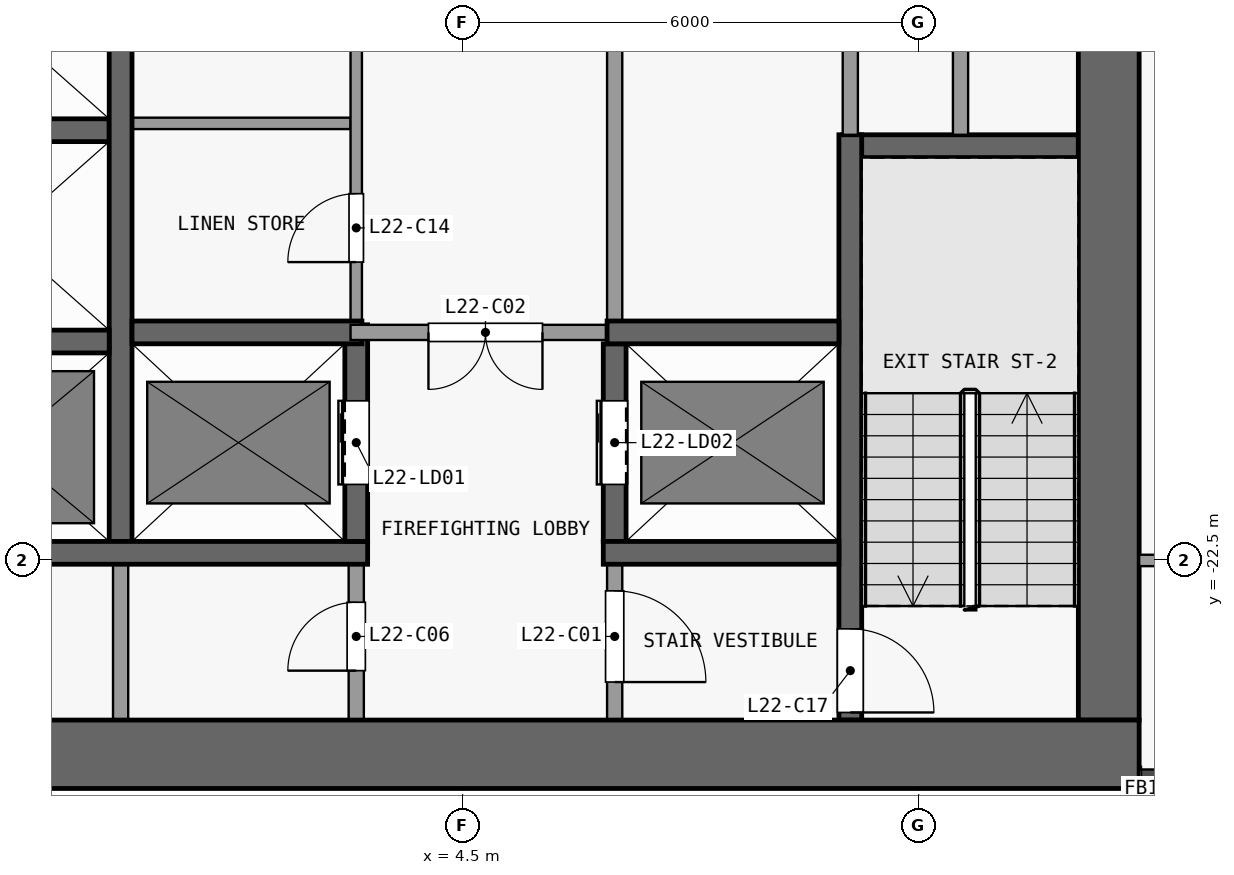
"""IFC4 building model, lengths in metres.
Left out: names, types, materials, properties, quantities, classifications, styles, units other than length and angle.
Written with IfcOpenShell. Run it as: python <this file> out.ifc"""

import sys

from ifc_helpers import new_model, si_unit, direction, frame, frame_2d, origin, place, context, subcontext, project, spatial, rectangle, extrude, element, fill, save


model = new_model("IFC4")
c1 = context("Model", 3, precision=1e-05, world=origin(), true_north=direction((0.0, 1.0)))
c2 = subcontext(c1, "Body", "Model", "MODEL_VIEW")
j1 = project(units=[si_unit("LENGTHUNIT", "METRE"), si_unit("PLANEANGLEUNIT", "RADIAN")], contexts=[c1])
p1 = place(None, origin())
s1 = spatial("IfcSite", under=j1, at=p1, CompositionType="ELEMENT")
p2 = place(p1, origin())
s2 = spatial("IfcBuilding", under=s1, at=p2, CompositionType="ELEMENT")
p3 = place(p2, frame((0.0, 0.0, 91.9)))
s3 = spatial("IfcBuildingStorey", under=s2, at=p3, CompositionType="ELEMENT", Elevation=91.9)
p4 = place(p3, frame((-13.4, -25.05, 0.0), z_axis=(0.0, 0.0, 1.0), x_axis=(1.0, 0.0, 0.0)))
e1 = element("IfcWall", 1, at=p4, inside=s3, PredefinedType="SHEAR", context=c2, shape_type="SweptSolid", body=[
    extrude(rectangle(XDim=26.8, YDim=0.9, at=frame_2d((13.4, 0.0))), origin(), (0.0, 0.0, 1.0), 3.3),
])
p5 = place(p3, frame((13.0, -24.6, 0.0), z_axis=(0.0, 0.0, 1.0), x_axis=(0.0, 1.0, 0.0)))
e2 = element("IfcWall", 2, at=p5, inside=s3, PredefinedType="SHEAR", context=c2, shape_type="SweptSolid", body=[
    extrude(rectangle(XDim=16.1, YDim=0.8, at=frame_2d((8.05, 0.0))), origin(), (0.0, 0.0, 1.0), 3.3),
])
p6 = place(p3, frame((-2.95, -22.4, 0.0), z_axis=(0.0, 0.0, 1.0), x_axis=(1.0, 0.0, 0.0)))
e3 = element("IfcWall", 3, at=p6, inside=s3, PredefinedType="SHEAR", context=c2, shape_type="SweptSolid", body=[
    extrude(rectangle(XDim=6.2, YDim=0.3, at=frame_2d((3.1, 0.0))), origin(), (0.0, 0.0, 1.0), 3.3),
])
p7 = place(p3, frame((6.35, -22.4, 0.0), z_axis=(0.0, 0.0, 1.0), x_axis=(1.0, 0.0, 0.0)))
e4 = element("IfcWall", 4, at=p7, inside=s3, PredefinedType="SHEAR", context=c2, shape_type="SweptSolid", body=[
    extrude(rectangle(XDim=3.1, YDim=0.3, at=frame_2d((1.55, 0.0))), origin(), (0.0, 0.0, 1.0), 3.3),
])
p8 = place(p3, frame((-2.95, -19.62, 0.0), z_axis=(0.0, 0.0, 1.0), x_axis=(1.0, 0.0, 0.0)))
e5 = element("IfcWall", 5, at=p8, inside=s3, PredefinedType="SHEAR", context=c2, shape_type="SweptSolid", body=[
    extrude(rectangle(XDim=2.8, YDim=0.3, at=frame_2d((1.4, 0.0))), origin(), (0.0, 0.0, 1.0), 3.3),
])
p9 = place(p3, frame((0.15, -19.5, 0.0), z_axis=(0.0, 0.0, 1.0), x_axis=(1.0, 0.0, 0.0)))
e6 = element("IfcWall", 6, at=p9, inside=s3, PredefinedType="SHEAR", context=c2, shape_type="SweptSolid", body=[
    extrude(rectangle(XDim=3.025, YDim=0.3, at=frame_2d((1.513, 0.0))), origin(), (0.0, 0.0, 1.0), 3.3),
])
p10 = place(p3, frame((6.4, -19.5, 0.0), z_axis=(0.0, 0.0, 1.0), x_axis=(-1.0, 0.0, 0.0)))
e7 = element("IfcWall", 7, at=p10, inside=s3, PredefinedType="PARTITIONING", context=c2, shape_type="SweptSolid", body=[
    extrude(rectangle(XDim=3.375, YDim=0.2, at=frame_2d((1.688, 0.0))), origin(), (0.0, 0.0, 1.0), 3.3),
])
p11 = place(p10, frame((0.85, 0.0, 0.0)))
e8 = element("IfcOpeningElement", 8, at=p11, cuts=e7, PredefinedType="OPENING", context=c2, shape_type="SweptSolid", body=[
    extrude(rectangle(XDim=1.5, YDim=2.1, at=frame_2d((0.75, 1.05))), frame((0.0, 0.11, 0.0), z_axis=(0.0, -1.0, 0.0), x_axis=(1.0, 0.0, 0.0)), (0.0, 0.0, 1.0), 0.22),
])
p12 = place(p3, frame((6.4, -19.5, 0.0), z_axis=(0.0, 0.0, 1.0), x_axis=(1.0, 0.0, 0.0)))
e9 = element("IfcWall", 9, at=p12, inside=s3, PredefinedType="SHEAR", context=c2, shape_type="SweptSolid", body=[
    extrude(rectangle(XDim=3.05, YDim=0.3, at=frame_2d((1.525, 0.0))), origin(), (0.0, 0.0, 1.0), 3.3),
])
p13 = place(p3, frame((9.5, -17.05, 0.0), z_axis=(0.0, 0.0, 1.0), x_axis=(1.0, 0.0, 0.0)))
e10 = element("IfcWall", 10, at=p13, inside=s3, PredefinedType="SHEAR", context=c2, shape_type="SweptSolid", body=[
    extrude(rectangle(XDim=3.1, YDim=0.3, at=frame_2d((1.55, 0.0))), origin(), (0.0, 0.0, 1.0), 3.3),
])
p14 = place(p3, frame((-2.95, -16.84, 0.0), z_axis=(0.0, 0.0, 1.0), x_axis=(1.0, 0.0, 0.0)))
e11 = element("IfcWall", 11, at=p14, inside=s3, PredefinedType="SHEAR", context=c2, shape_type="SweptSolid", body=[
    extrude(rectangle(XDim=2.8, YDim=0.3, at=frame_2d((1.4, 0.0))), origin(), (0.0, 0.0, 1.0), 3.3),
])
p15 = place(p3, frame((0.15, -16.75, 0.0), z_axis=(0.0, 0.0, 1.0), x_axis=(1.0, 0.0, 0.0)))
e12 = element("IfcWall", 12, at=p15, inside=s3, PredefinedType="PARTITIONING", context=c2, shape_type="SweptSolid", body=[
    extrude(rectangle(XDim=2.875, YDim=0.15, at=frame_2d((1.438, 0.0))), origin(), (0.0, 0.0, 1.0), 3.3),
])
p16 = place(p3, frame((0.0, -24.6, 0.0), z_axis=(0.0, 0.0, 1.0), x_axis=(0.0, 1.0, 0.0)))
e13 = element("IfcWall", 13, at=p16, inside=s3, PredefinedType="PARTITIONING", context=c2, shape_type="SweptSolid", body=[
    extrude(rectangle(XDim=2.05, YDim=0.2, at=frame_2d((1.025, 0.0))), origin(), (0.0, 0.0, 1.0), 3.3),
])
p17 = place(p3, frame((0.0, -22.25, 0.0), z_axis=(0.0, 0.0, 1.0), x_axis=(0.0, 1.0, 0.0)))
e14 = element("IfcWall", 14, at=p17, inside=s3, PredefinedType="SHEAR", context=c2, shape_type="SweptSolid", body=[
    extrude(rectangle(XDim=13.75, YDim=0.3, at=frame_2d((6.875, 0.0))), origin(), (0.0, 0.0, 1.0), 3.3),
])
p18 = place(p3, frame((3.1, -24.6, 0.0), z_axis=(0.0, 0.0, 1.0), x_axis=(0.0, 1.0, 0.0)))
e15 = element("IfcWall", 15, at=p18, inside=s3, PredefinedType="PARTITIONING", context=c2, shape_type="SweptSolid", body=[
    extrude(rectangle(XDim=2.05, YDim=0.2, at=frame_2d((1.025, 0.0))), origin(), (0.0, 0.0, 1.0), 3.3),
])
p19 = place(p18, frame((0.65, 0.0, 0.0)))
e16 = element("IfcOpeningElement", 16, at=p19, cuts=e15, PredefinedType="OPENING", context=c2, shape_type="SweptSolid", body=[
    extrude(rectangle(XDim=0.9, YDim=2.1, at=frame_2d((0.45, 1.05))), frame((0.0, 0.11, 0.0), z_axis=(0.0, -1.0, 0.0), x_axis=(1.0, 0.0, 0.0)), (0.0, 0.0, 1.0), 0.22),
])
p20 = place(p3, frame((3.1, -22.25, 0.0), z_axis=(0.0, 0.0, 1.0), x_axis=(0.0, 1.0, 0.0)))
e17 = element("IfcWall", 17, at=p20, inside=s3, PredefinedType="SHEAR", context=c2, shape_type="SweptSolid", body=[
    extrude(rectangle(XDim=2.85, YDim=0.3, at=frame_2d((1.425, 0.0))), origin(), (0.0, 0.0, 1.0), 3.3),
])
p21 = place(p20, frame((0.75, 0.0, 0.0)))
e18 = element("IfcOpeningElement", 18, at=p21, cuts=e17, PredefinedType="OPENING", context=c2, shape_type="SweptSolid", body=[
    extrude(rectangle(XDim=1.1, YDim=2.1, at=frame_2d((0.55, 1.05))), frame((0.0, 0.16, 0.0), z_axis=(0.0, -1.0, 0.0), x_axis=(1.0, 0.0, 0.0)), (0.0, 0.0, 1.0), 0.32),
])
p22 = place(p3, frame((3.1, -19.4, 0.0), z_axis=(0.0, 0.0, 1.0), x_axis=(0.0, 1.0, 0.0)))
e19 = element("IfcWall", 19, at=p22, inside=s3, PredefinedType="PARTITIONING", context=c2, shape_type="SweptSolid", body=[
    extrude(rectangle(XDim=10.9, YDim=0.15, at=frame_2d((5.45, 0.0))), origin(), (0.0, 0.0, 1.0), 3.3),
])
p23 = place(p22, frame((0.825, 0.0, 0.0)))
e20 = element("IfcOpeningElement", 20, at=p23, cuts=e19, PredefinedType="OPENING", context=c2, shape_type="SweptSolid", body=[
    extrude(rectangle(XDim=0.9, YDim=2.1, at=frame_2d((0.45, 1.05))), frame((0.0, 0.085, 0.0), z_axis=(0.0, -1.0, 0.0), x_axis=(1.0, 0.0, 0.0)), (0.0, 0.0, 1.0), 0.17),
])
p24 = place(p22, frame((6.175, 0.0, 0.0)))
e21 = element("IfcOpeningElement", 21, at=p24, cuts=e19, PredefinedType="OPENING", context=c2, shape_type="SweptSolid", body=[
    extrude(rectangle(XDim=1.2, YDim=2.1, at=frame_2d((0.6, 1.05))), frame((0.0, 0.085, 0.0), z_axis=(0.0, -1.0, 0.0), x_axis=(1.0, 0.0, 0.0)), (0.0, 0.0, 1.0), 0.17),
])
p25 = place(p3, frame((6.5, -22.55, 0.0), z_axis=(0.0, 0.0, 1.0), x_axis=(0.0, -1.0, 0.0)))
e22 = element("IfcWall", 22, at=p25, inside=s3, PredefinedType="PARTITIONING", context=c2, shape_type="SweptSolid", body=[
    extrude(rectangle(XDim=2.05, YDim=0.2, at=frame_2d((1.025, 0.0))), origin(), (0.0, 0.0, 1.0), 3.3),
])
p26 = place(p25, frame((0.35, 0.0, 0.0)))
e23 = element("IfcOpeningElement", 23, at=p26, cuts=e22, PredefinedType="OPENING", context=c2, shape_type="SweptSolid", body=[
    extrude(rectangle(XDim=1.2, YDim=2.1, at=frame_2d((0.6, 1.05))), frame((0.0, 0.11, 0.0), z_axis=(0.0, -1.0, 0.0), x_axis=(1.0, 0.0, 0.0)), (0.0, 0.0, 1.0), 0.22),
])
p27 = place(p3, frame((6.5, -22.25, 0.0), z_axis=(0.0, 0.0, 1.0), x_axis=(0.0, 1.0, 0.0)))
e24 = element("IfcWall", 24, at=p27, inside=s3, PredefinedType="SHEAR", context=c2, shape_type="SweptSolid", body=[
    extrude(rectangle(XDim=2.6, YDim=0.3, at=frame_2d((1.3, 0.0))), origin(), (0.0, 0.0, 1.0), 3.3),
])
p28 = place(p27, frame((0.75, 0.0, 0.0)))
e25 = element("IfcOpeningElement", 25, at=p28, cuts=e24, PredefinedType="OPENING", context=c2, shape_type="SweptSolid", body=[
    extrude(rectangle(XDim=1.1, YDim=2.1, at=frame_2d((0.55, 1.05))), frame((0.0, 0.16, 0.0), z_axis=(0.0, -1.0, 0.0), x_axis=(1.0, 0.0, 0.0)), (0.0, 0.0, 1.0), 0.32),
])
p29 = place(p3, frame((6.5, -8.5, 0.0), z_axis=(0.0, 0.0, 1.0), x_axis=(0.0, -1.0, 0.0)))
e26 = element("IfcWall", 26, at=p29, inside=s3, PredefinedType="PARTITIONING", context=c2, shape_type="SweptSolid", body=[
    extrude(rectangle(XDim=10.85, YDim=0.2, at=frame_2d((5.425, 0.0))), origin(), (0.0, 0.0, 1.0), 3.3),
])
p30 = place(p29, frame((4.9, 0.0, 0.0)))
e27 = element("IfcOpeningElement", 27, at=p30, cuts=e26, PredefinedType="OPENING", context=c2, shape_type="SweptSolid", body=[
    extrude(rectangle(XDim=1.2, YDim=2.1, at=frame_2d((0.6, 1.05))), frame((0.0, 0.11, 0.0), z_axis=(0.0, -1.0, 0.0), x_axis=(1.0, 0.0, 0.0)), (0.0, 0.0, 1.0), 0.22),
])
p31 = place(p3, frame((9.6, -16.9, 0.0), z_axis=(0.0, 0.0, 1.0), x_axis=(0.0, -1.0, 0.0)))
e28 = element("IfcWall", 28, at=p31, inside=s3, PredefinedType="SHEAR", context=c2, shape_type="SweptSolid", body=[
    extrude(rectangle(XDim=7.7, YDim=0.3, at=frame_2d((3.85, 0.0))), origin(), (0.0, 0.0, 1.0), 3.3),
])
p32 = place(p31, frame((6.5, 0.0, 0.0)))
e29 = element("IfcOpeningElement", 29, at=p32, cuts=e28, PredefinedType="OPENING", context=c2, shape_type="SweptSolid", body=[
    extrude(rectangle(XDim=1.1, YDim=2.1, at=frame_2d((0.55, 1.05))), frame((0.0, 0.16, 0.0), z_axis=(0.0, -1.0, 0.0), x_axis=(1.0, 0.0, 0.0)), (0.0, 0.0, 1.0), 0.32),
])
p33 = place(p3, frame((9.6, -16.9, 0.0), z_axis=(0.0, 0.0, 1.0), x_axis=(0.0, 1.0, 0.0)))
e30 = element("IfcWall", 30, at=p33, inside=s3, PredefinedType="PARTITIONING", context=c2, shape_type="SweptSolid", body=[
    extrude(rectangle(XDim=8.4, YDim=0.2, at=frame_2d((4.2, 0.0))), origin(), (0.0, 0.0, 1.0), 3.3),
])
p34 = place(p3, frame((11.05, -10.5, 0.0), z_axis=(0.0, 0.0, 1.0), x_axis=(0.0, -1.0, 0.0)))
e31 = element("IfcWall", 31, at=p34, inside=s3, PredefinedType="PARTITIONING", context=c2, shape_type="SweptSolid", body=[
    extrude(rectangle(XDim=6.4, YDim=0.2, at=frame_2d((3.2, 0.0))), origin(), (0.0, 0.0, 1.0), 3.3),
])
p35 = place(p34, frame((2.875, 0.0, 0.0)))
e32 = element("IfcOpeningElement", 32, at=p35, cuts=e31, PredefinedType="OPENING", context=c2, shape_type="SweptSolid", body=[
    extrude(rectangle(XDim=0.9, YDim=2.1, at=frame_2d((0.45, 1.05))), frame((0.0, 0.11, 0.0), z_axis=(0.0, -1.0, 0.0), x_axis=(1.0, 0.0, 0.0)), (0.0, 0.0, 1.0), 0.22),
])
p36 = place(p3, frame((13.4, -22.5, 0.0), z_axis=(0.0, 0.0, 1.0), x_axis=(1.0, 0.0, 0.0)))
e33 = element("IfcWall", 33, at=p36, inside=s3, PredefinedType="PARTITIONING", context=c2, shape_type="SweptSolid", body=[
    extrude(rectangle(XDim=2.925, YDim=0.15, at=frame_2d((1.462, 0.0))), origin(), (0.0, 0.0, 1.0), 3.3),
])
p37 = place(p36, frame((1.0, 0.0, 0.0)))
e34 = element("IfcOpeningElement", 34, at=p37, cuts=e33, PredefinedType="OPENING", context=c2, shape_type="SweptSolid", body=[
    extrude(rectangle(XDim=0.9, YDim=2.1, at=frame_2d((0.45, 1.05))), frame((0.0, 0.085, 0.0), z_axis=(0.0, -1.0, 0.0), x_axis=(1.0, 0.0, 0.0)), (0.0, 0.0, 1.0), 0.17),
])
p38 = place(p21, origin())
e35 = element("IfcDoor", 35, at=p38, inside=s3, OperationType="DOUBLE_DOOR_SLIDING", PredefinedType="DOOR", context=c2, shape_type="SweptSolid", body=[
    extrude(rectangle(XDim=1.1, YDim=2.1, at=frame_2d((0.55, 1.05))), frame((0.0, 0.025, 0.0), z_axis=(0.0, -1.0, 0.0), x_axis=(1.0, 0.0, 0.0)), (0.0, 0.0, 1.0), 0.05),
])
fill(e18, e35)
p39 = place(p28, origin())
e36 = element("IfcDoor", 36, at=p39, inside=s3, OperationType="DOUBLE_DOOR_SLIDING", PredefinedType="DOOR", context=c2, shape_type="SweptSolid", body=[
    extrude(rectangle(XDim=1.1, YDim=2.1, at=frame_2d((0.55, 1.05))), frame((0.0, 0.025, 0.0), z_axis=(0.0, -1.0, 0.0), x_axis=(1.0, 0.0, 0.0)), (0.0, 0.0, 1.0), 0.05),
])
fill(e25, e36)
p40 = place(p26, origin())
e37 = element("IfcDoor", 37, at=p40, inside=s3, OperationType="SINGLE_SWING_RIGHT", PredefinedType="DOOR", context=c2, shape_type="SweptSolid", body=[
    extrude(rectangle(XDim=1.2, YDim=2.1, at=frame_2d((0.6, 1.05))), frame((0.0, 0.025, 0.0), z_axis=(0.0, -1.0, 0.0), x_axis=(1.0, 0.0, 0.0)), (0.0, 0.0, 1.0), 0.05),
])
fill(e23, e37)
p41 = place(p11, origin())
e38 = element("IfcDoor", 38, at=p41, inside=s3, OperationType="DOUBLE_DOOR_SINGLE_SWING", PredefinedType="DOOR", context=c2, shape_type="SweptSolid", body=[
    extrude(rectangle(XDim=1.5, YDim=2.1, at=frame_2d((0.75, 1.05))), frame((0.0, 0.025, 0.0), z_axis=(0.0, -1.0, 0.0), x_axis=(1.0, 0.0, 0.0)), (0.0, 0.0, 1.0), 0.05),
])
fill(e8, e38)
p42 = place(p19, origin())
e39 = element("IfcDoor", 39, at=p42, inside=s3, OperationType="SINGLE_SWING_LEFT", PredefinedType="DOOR", context=c2, shape_type="SweptSolid", body=[
    extrude(rectangle(XDim=0.9, YDim=2.1, at=frame_2d((0.45, 1.05))), frame((0.0, 0.025, 0.0), z_axis=(0.0, -1.0, 0.0), x_axis=(1.0, 0.0, 0.0)), (0.0, 0.0, 1.0), 0.05),
])
fill(e16, e39)
p43 = place(p23, origin())
e40 = element("IfcDoor", 40, at=p43, inside=s3, OperationType="SINGLE_SWING_LEFT", PredefinedType="DOOR", context=c2, shape_type="SweptSolid", body=[
    extrude(rectangle(XDim=0.9, YDim=2.1, at=frame_2d((0.45, 1.05))), frame((0.0, 0.025, 0.0), z_axis=(0.0, -1.0, 0.0), x_axis=(1.0, 0.0, 0.0)), (0.0, 0.0, 1.0), 0.05),
])
fill(e20, e40)
p44 = place(p32, origin())
e41 = element("IfcDoor", 41, at=p44, inside=s3, OperationType="SINGLE_SWING_RIGHT", PredefinedType="DOOR", context=c2, shape_type="SweptSolid", body=[
    extrude(rectangle(XDim=1.1, YDim=2.1, at=frame_2d((0.55, 1.05))), frame((0.0, 0.025, 0.0), z_axis=(0.0, -1.0, 0.0), x_axis=(1.0, 0.0, 0.0)), (0.0, 0.0, 1.0), 0.05),
])
fill(e29, e41)
save(model, sys.argv[1])
